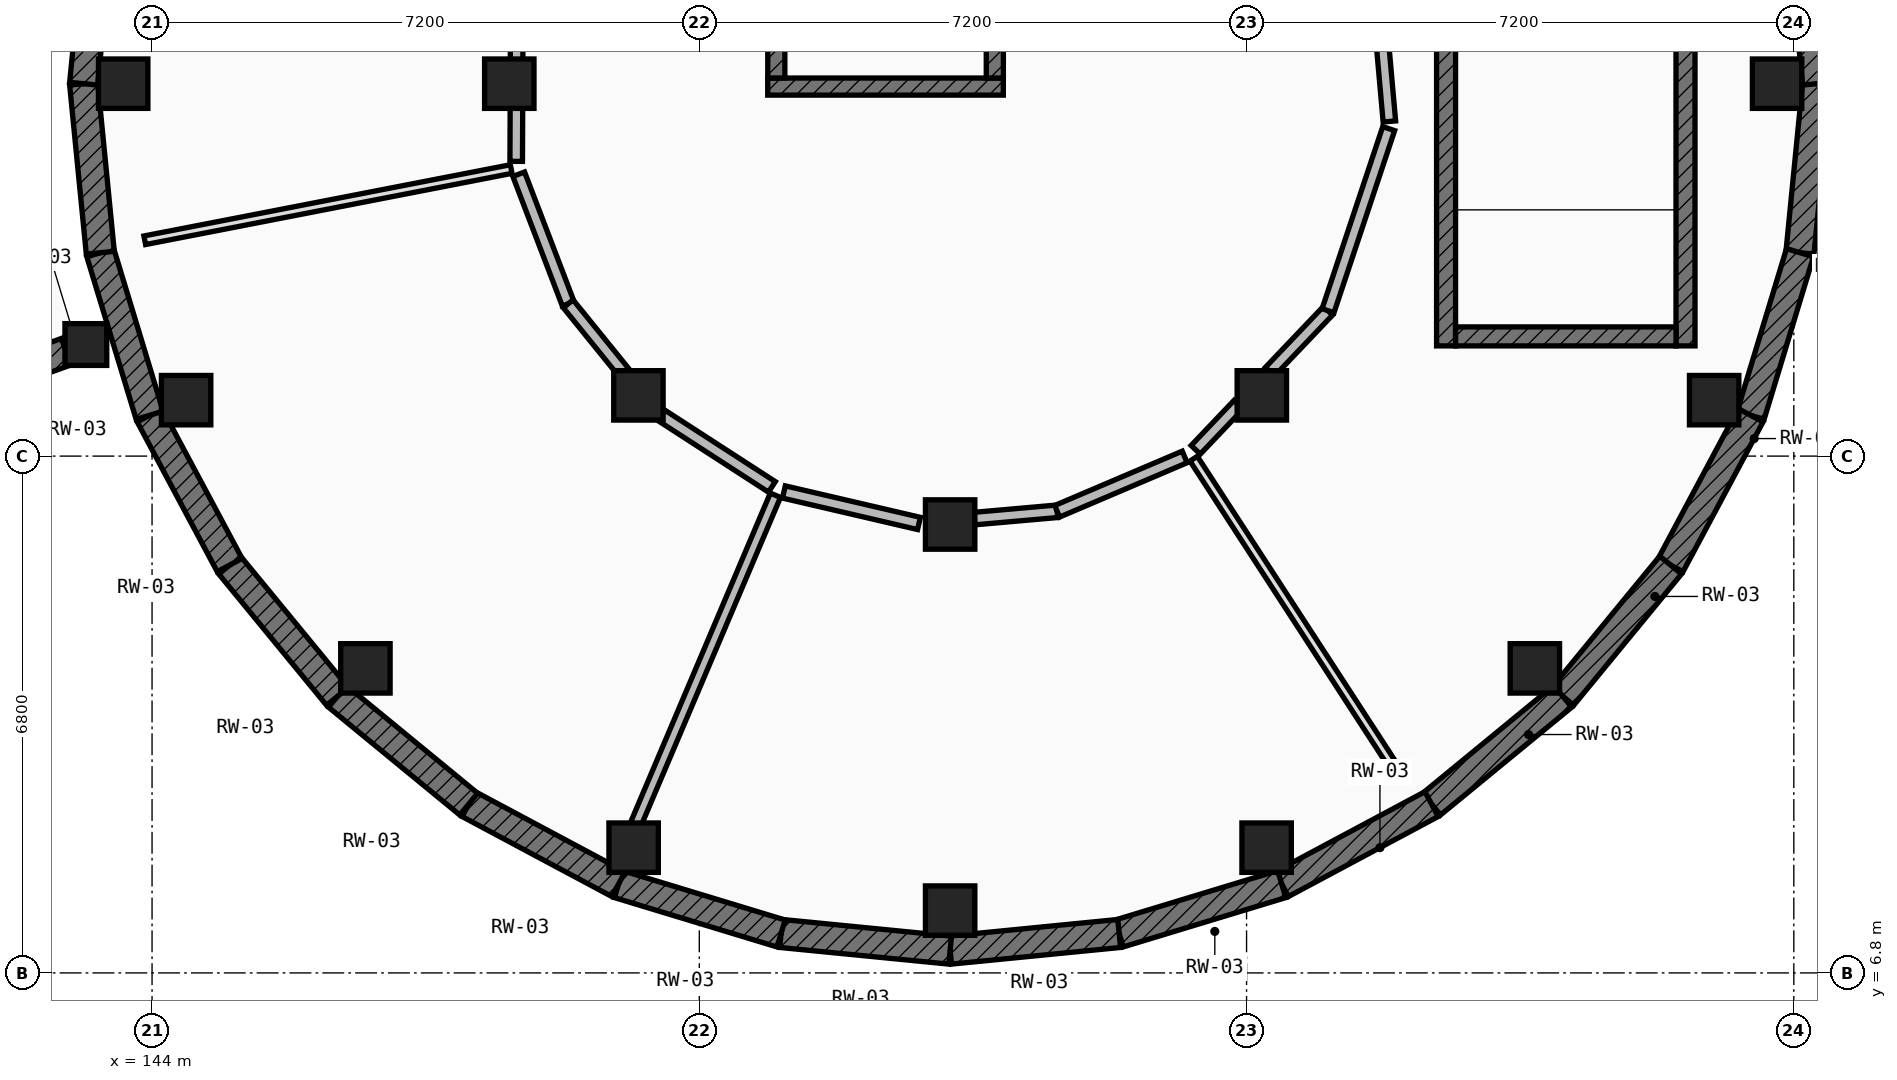
"""IFC4 building model, lengths in metres.
Left out: names, types, materials, properties, quantities, classifications, styles, units other than length and angle.
Written with IfcOpenShell. Run it as: python <this file> out.ifc"""

import sys

from ifc_helpers import new_model, si_unit, direction, frame, frame_2d, origin, origin_2d, place, context, subcontext, project, spatial, rectangle, extrude, element, fill, save


model = new_model("IFC4")
c1 = context("Model", 3, precision=1e-05, world=origin(), true_north=direction((0.0, 1.0)))
c2 = subcontext(c1, "Body", "Model", "MODEL_VIEW")
j1 = project(units=[si_unit("LENGTHUNIT", "METRE"), si_unit("PLANEANGLEUNIT", "RADIAN")], contexts=[c1])
p1 = place(None, origin())
s1 = spatial("IfcSite", under=j1, at=p1, CompositionType="ELEMENT")
p2 = place(p1, origin())
s2 = spatial("IfcBuilding", under=s1, at=p2, CompositionType="ELEMENT")
p3 = place(p2, frame((0.0, 0.0, -4.55)))
s3 = spatial("IfcBuildingStorey", under=s2, at=p3, CompositionType="ELEMENT", Elevation=-4.55)
for number, where, z_axis, x_axis in (
    (1, (165.38, 18.5, 0.0), (0.0, 0.0, 1.0), (1.0, 0.0, 0.0)),
    (2, (143.62, 18.5, 0.0), (0.0, 0.0, 1.0), (1.0, 0.0, 0.0)),
    (3, (144.448, 14.336, 0.0), (0.0, 0.0, 1.0), (1.0, 0.0, 0.0)),
    (4, (146.807, 10.807, 0.0), (0.0, 0.0, 1.0), (1.0, 0.0, 0.0)),
    (5, (150.336, 8.448, 0.0), (0.0, 0.0, 1.0), (1.0, 0.0, 0.0)),
    (6, (154.5, 7.62, 0.0), (0.0, 0.0, 1.0), (1.0, 0.0, 0.0)),
    (7, (158.664, 8.448, 0.0), (0.0, 0.0, 1.0), (1.0, 0.0, 0.0)),
    (8, (162.193, 10.807, 0.0), (0.0, 0.0, 1.0), (1.0, 0.0, 0.0)),
    (9, (164.552, 14.336, 0.0), (0.0, 0.0, 1.0), (1.0, 0.0, 0.0)),
    (10, (148.7, 18.5, 0.0), (0.0, 0.0, 1.0), (1.0, 0.0, 0.0)),
    (11, (150.399, 14.399, 0.0), (0.0, 0.0, 1.0), (1.0, 0.0, 0.0)),
    (12, (154.5, 12.7, 0.0), (0.0, 0.0, 1.0), (1.0, 0.0, 0.0)),
    (13, (158.601, 14.399, 0.0), (0.0, 0.0, 1.0), (1.0, 0.0, 0.0)),
):
    element("IfcColumn", number, at=place(p3, frame(where, z_axis=z_axis, x_axis=x_axis)), inside=s3, PredefinedType="COLUMN", context=c2, shape_type="SweptSolid", body=[
        extrude(rectangle(XDim=0.65, YDim=0.65, at=origin_2d()), origin(), (0.0, 0.0, 1.0), 4.55),
    ])
p4 = place(p3, frame((143.129, 15.068, 0.0), z_axis=(0.0, 0.0, 1.0), x_axis=(1.0, 0.0, 0.0)))
e14 = element("IfcColumn", 14, at=p4, inside=s3, PredefinedType="COLUMN", context=c2, shape_type="SweptSolid", body=[
    extrude(rectangle(XDim=0.55, YDim=0.55, at=origin_2d()), origin(), (0.0, 0.0, 1.0), 4.55),
])
p5 = place(p3, frame((165.9, 18.5, 0.0), z_axis=(0.0, 0.0, 1.0), x_axis=(-0.097989369151, -0.995187461503, 0.0)))
e15 = element("IfcWall", 15, at=p5, inside=s3, PredefinedType="USERDEFINED", context=c2, shape_type="SweptSolid", body=[
    extrude(rectangle(XDim=2.235, YDim=0.37, at=frame_2d((1.117, 0.0))), origin(), (0.0, 0.0, 1.0), 3.348),
])
p6 = place(p3, frame((165.681, 16.276, 0.0), z_axis=(0.0, 0.0, 1.0), x_axis=(-0.290322655883, -0.956928814218, 0.0)))
e16 = element("IfcWall", 16, at=p6, inside=s3, PredefinedType="USERDEFINED", context=c2, shape_type="SweptSolid", body=[
    extrude(rectangle(XDim=2.235, YDim=0.37, at=frame_2d((1.118, 0.0))), origin(), (0.0, 0.0, 1.0), 3.348),
])
for number, where, z_axis, x_axis in (
    (17, (165.032, 14.137, 0.0), (0.0, 0.0, 1.0), (-0.471, -0.882, 0.0)),
    (18, (163.979, 12.166, 0.0), (0.0, 0.0, 1.0), (-0.635, -0.773, 0.0)),
    (19, (162.561, 10.439, 0.0), (0.0, 0.0, 1.0), (-0.773, -0.635, 0.0)),
    (20, (160.834, 9.021, 0.0), (0.0, 0.0, 1.0), (-0.882, -0.471, 0.0)),
):
    element("IfcWall", number, at=place(p3, frame(where, z_axis=z_axis, x_axis=x_axis)), inside=s3, PredefinedType="USERDEFINED", context=c2, shape_type="SweptSolid", body=[
        extrude(rectangle(XDim=2.235, YDim=0.37, at=frame_2d((1.117, 0.0))), origin(), (0.0, 0.0, 1.0), 3.348),
    ])
p7 = place(p3, frame((158.863, 7.968, 0.0), z_axis=(0.0, 0.0, 1.0), x_axis=(-0.956928814218, -0.290322655883, 0.0)))
e21 = element("IfcWall", 21, at=p7, inside=s3, PredefinedType="USERDEFINED", context=c2, shape_type="SweptSolid", body=[
    extrude(rectangle(XDim=2.235, YDim=0.37, at=frame_2d((1.118, 0.0))), origin(), (0.0, 0.0, 1.0), 3.348),
])
for number, where, z_axis, x_axis in (
    (22, (156.724, 7.319, 0.0), (0.0, 0.0, 1.0), (-0.995, -0.098, 0.0)),
    (23, (154.5, 7.1, 0.0), (0.0, 0.0, 1.0), (-0.995, 0.098, 0.0)),
):
    element("IfcWall", number, at=place(p3, frame(where, z_axis=z_axis, x_axis=x_axis)), inside=s3, PredefinedType="USERDEFINED", context=c2, shape_type="SweptSolid", body=[
        extrude(rectangle(XDim=2.235, YDim=0.37, at=frame_2d((1.117, 0.0))), origin(), (0.0, 0.0, 1.0), 3.348),
    ])
p8 = place(p3, frame((152.276, 7.319, 0.0), z_axis=(0.0, 0.0, 1.0), x_axis=(-0.956928814218, 0.290322655883, 0.0)))
e24 = element("IfcWall", 24, at=p8, inside=s3, PredefinedType="USERDEFINED", context=c2, shape_type="SweptSolid", body=[
    extrude(rectangle(XDim=2.235, YDim=0.37, at=frame_2d((1.118, 0.0))), origin(), (0.0, 0.0, 1.0), 3.348),
])
for number, where, z_axis, x_axis in (
    (25, (150.137, 7.968, 0.0), (0.0, 0.0, 1.0), (-0.882, 0.471, 0.0)),
    (26, (148.166, 9.021, 0.0), (0.0, 0.0, 1.0), (-0.773, 0.635, 0.0)),
    (27, (146.439, 10.439, 0.0), (0.0, 0.0, 1.0), (-0.635, 0.773, 0.0)),
    (28, (145.021, 12.166, 0.0), (0.0, 0.0, 1.0), (-0.471, 0.882, 0.0)),
):
    element("IfcWall", number, at=place(p3, frame(where, z_axis=z_axis, x_axis=x_axis)), inside=s3, PredefinedType="USERDEFINED", context=c2, shape_type="SweptSolid", body=[
        extrude(rectangle(XDim=2.235, YDim=0.37, at=frame_2d((1.117, 0.0))), origin(), (0.0, 0.0, 1.0), 3.348),
    ])
p9 = place(p3, frame((143.968, 14.137, 0.0), z_axis=(0.0, 0.0, 1.0), x_axis=(-0.290322655883, 0.956928814218, 0.0)))
e29 = element("IfcWall", 29, at=p9, inside=s3, PredefinedType="USERDEFINED", context=c2, shape_type="SweptSolid", body=[
    extrude(rectangle(XDim=2.235, YDim=0.37, at=frame_2d((1.118, 0.0))), origin(), (0.0, 0.0, 1.0), 3.348),
])
for number, where, z_axis, x_axis in (
    (30, (143.319, 16.276, 0.0), (0.0, 0.0, 1.0), (-0.098, 0.995, 0.0)),
    (31, (143.1, 18.5, 0.0), (0.0, 0.0, 1.0), (0.098, 0.995, 0.0)),
    (32, (165.681, 20.724, 0.0), (0.0, 0.0, 1.0), (0.098, -0.995, 0.0)),
):
    element("IfcWall", number, at=place(p3, frame(where, z_axis=z_axis, x_axis=x_axis)), inside=s3, PredefinedType="USERDEFINED", context=c2, shape_type="SweptSolid", body=[
        extrude(rectangle(XDim=2.235, YDim=0.37, at=frame_2d((1.117, 0.0))), origin(), (0.0, 0.0, 1.0), 3.348),
    ])
p10 = place(p3, frame((138.311, 13.323, 0.0), z_axis=(0.0, 0.0, 1.0), x_axis=(0.940238058324, 0.340517831661, 0.0)))
e33 = element("IfcWall", 33, at=p10, inside=s3, PredefinedType="USERDEFINED", context=c2, shape_type="SweptSolid", body=[
    extrude(rectangle(XDim=4.849, YDim=0.37, at=frame_2d((2.424, 0.0))), origin(), (0.0, 0.0, 1.0), 3.645),
])
p11 = place(p3, frame((161.025, 21.95, 0.0), z_axis=(0.0, 0.0, 1.0), x_axis=(0.0, -1.0, 0.0)))
e34 = element("IfcWall", 34, at=p11, inside=s3, PredefinedType="SHEAR", context=c2, shape_type="SweptSolid", body=[
    extrude(rectangle(XDim=6.9, YDim=0.25, at=frame_2d((3.45, 0.0))), origin(), (0.0, 0.0, 1.0), 4.148),
])
p12 = place(p11, frame((0.43, 0.0, 0.0)))
e35 = element("IfcOpeningElement", 35, at=p12, cuts=e34, PredefinedType="OPENING", context=c2, shape_type="SweptSolid", body=[
    extrude(rectangle(XDim=1.1, YDim=2.15, at=frame_2d((0.55, 1.075))), frame((0.0, 0.135, 0.0), z_axis=(0.0, -1.0, 0.0), x_axis=(1.0, 0.0, 0.0)), (0.0, 0.0, 1.0), 0.27),
])
p13 = place(p3, frame((164.175, 21.95, 0.0), z_axis=(0.0, 0.0, 1.0), x_axis=(0.0, -1.0, 0.0)))
e36 = element("IfcWall", 36, at=p13, inside=s3, PredefinedType="SHEAR", context=c2, shape_type="SweptSolid", body=[
    extrude(rectangle(XDim=6.9, YDim=0.25, at=frame_2d((3.45, 0.0))), origin(), (0.0, 0.0, 1.0), 4.148),
])
p14 = place(p3, frame((161.15, 15.175, 0.0), z_axis=(0.0, 0.0, 1.0), x_axis=(1.0, 0.0, 0.0)))
e37 = element("IfcWall", 37, at=p14, inside=s3, PredefinedType="SHEAR", context=c2, shape_type="SweptSolid", body=[
    extrude(rectangle(XDim=2.9, YDim=0.25, at=frame_2d((1.45, 0.0))), origin(), (0.0, 0.0, 1.0), 4.148),
])
p15 = place(p3, frame((152.1, 18.462, 0.0), z_axis=(0.0, 0.0, 1.0), x_axis=(1.0, 0.0, 0.0)))
e38 = element("IfcWall", 38, at=p15, inside=s3, PredefinedType="SHEAR", context=c2, shape_type="SweptSolid", body=[
    extrude(rectangle(XDim=3.1, YDim=0.225, at=frame_2d((1.55, 0.0))), origin(), (0.0, 0.0, 1.0), 4.148),
])
p16 = place(p15, frame((0.95, 0.0, 0.0)))
e39 = element("IfcOpeningElement", 39, at=p16, cuts=e38, PredefinedType="OPENING", context=c2, shape_type="SweptSolid", body=[
    extrude(rectangle(XDim=1.2, YDim=2.2, at=frame_2d((0.6, 1.1))), frame((0.0, 0.123, 0.0), z_axis=(0.0, -1.0, 0.0), x_axis=(1.0, 0.0, 0.0)), (0.0, 0.0, 1.0), 0.245),
])
for number, where, z_axis, x_axis in (
    (40, (152.213, 18.575, 0.0), (0.0, 0.0, 1.0), (0.0, 1.0, 0.0)),
    (41, (155.088, 18.575, 0.0), (0.0, 0.0, 1.0), (0.0, 1.0, 0.0)),
):
    element("IfcWall", number, at=place(p3, frame(where, z_axis=z_axis, x_axis=x_axis)), inside=s3, PredefinedType="SHEAR", context=c2, shape_type="SweptSolid", body=[
        extrude(rectangle(XDim=2.15, YDim=0.225, at=frame_2d((1.075, 0.0))), origin(), (0.0, 0.0, 1.0), 4.148),
    ])
p17 = place(p3, frame((148.725, 17.377, 0.0), z_axis=(0.0, 0.0, 1.0), x_axis=(-0.981631167978, -0.190788495604, 0.0)))
e42 = element("IfcWall", 42, at=p17, inside=s3, PredefinedType="PARTITIONING", context=c2, shape_type="SweptSolid", body=[
    extrude(rectangle(XDim=4.911, YDim=0.115, at=frame_2d((2.456, 0.0))), origin(), (0.0, 0.0, 1.0), 3.323),
])
p18 = place(p3, frame((152.201, 13.085, 0.0), z_axis=(0.0, 0.0, 1.0), x_axis=(-0.390680175244, -0.920526480157, 0.0)))
e43 = element("IfcWall", 43, at=p18, inside=s3, PredefinedType="PARTITIONING", context=c2, shape_type="SweptSolid", body=[
    extrude(rectangle(XDim=4.907, YDim=0.145, at=frame_2d((2.453, 0.0))), origin(), (0.0, 0.0, 1.0), 3.323),
])
p19 = place(p3, frame((157.704, 13.566, 0.0), z_axis=(0.0, 0.0, 1.0), x_axis=(0.544732798291, -0.83860966991, 0.0)))
e44 = element("IfcWall", 44, at=p19, inside=s3, PredefinedType="PARTITIONING", context=c2, shape_type="SweptSolid", body=[
    extrude(rectangle(XDim=4.903, YDim=0.115, at=frame_2d((2.452, 0.0))), origin(), (0.0, 0.0, 1.0), 3.323),
])
p20 = place(p3, frame((148.799, 19.569, 0.0), z_axis=(0.0, 0.0, 1.0), x_axis=(-0.004213900998, -0.99999112148, 0.0)))
e45 = element("IfcWall", 45, at=p20, inside=s3, PredefinedType="PARTITIONING", context=c2, shape_type="SweptSolid", body=[
    extrude(rectangle(XDim=0.753, YDim=0.165, at=frame_2d((0.376, 0.0))), origin(), (0.0, 0.0, 1.0), 3.323),
])
p21 = place(p3, frame((148.794, 18.184, 0.0), z_axis=(0.0, 0.0, 1.0), x_axis=(-0.004149341873, -0.999991391444, 0.0)))
e46 = element("IfcWall", 46, at=p21, inside=s3, PredefinedType="PARTITIONING", context=c2, shape_type="SweptSolid", body=[
    extrude(rectangle(XDim=0.706, YDim=0.165, at=frame_2d((0.353, 0.0))), origin(), (0.0, 0.0, 1.0), 3.323),
])
p22 = place(p3, frame((148.824, 17.309, 0.0), z_axis=(0.0, 0.0, 1.0), x_axis=(0.356746140056, -0.934201365636, 0.0)))
e47 = element("IfcWall", 47, at=p22, inside=s3, PredefinedType="PARTITIONING", context=c2, shape_type="SweptSolid", body=[
    extrude(rectangle(XDim=1.825, YDim=0.165, at=frame_2d((0.913, 0.0))), origin(), (0.0, 0.0, 1.0), 3.323),
])
p23 = place(p22, frame((0.472, 0.0, 0.0)))
e48 = element("IfcOpeningElement", 48, at=p23, cuts=e47, PredefinedType="OPENING", context=c2, shape_type="SweptSolid", body=[
    extrude(rectangle(XDim=0.88, YDim=2.1, at=frame_2d((0.44, 1.05))), frame((0.0, 0.093, 0.0), z_axis=(0.0, -1.0, 0.0), x_axis=(1.0, 0.0, 0.0)), (0.0, 0.0, 1.0), 0.185),
])
p24 = place(p3, frame((149.475, 15.604, 0.0), z_axis=(0.0, 0.0, 1.0), x_axis=(0.62928673226, -0.777173216601, 0.0)))
e49 = element("IfcWall", 49, at=p24, inside=s3, PredefinedType="PARTITIONING", context=c2, shape_type="SweptSolid", body=[
    extrude(rectangle(XDim=1.19, YDim=0.165, at=frame_2d((0.595, 0.0))), origin(), (0.0, 0.0, 1.0), 3.323),
])
p25 = place(p3, frame((150.641, 14.175, 0.0), z_axis=(0.0, 0.0, 1.0), x_axis=(0.839472077777, -0.543402825382, 0.0)))
e50 = element("IfcWall", 50, at=p25, inside=s3, PredefinedType="PARTITIONING", context=c2, shape_type="SweptSolid", body=[
    extrude(rectangle(XDim=1.803, YDim=0.165, at=frame_2d((0.902, 0.0))), origin(), (0.0, 0.0, 1.0), 3.323),
])
p26 = place(p3, frame((152.313, 13.128, 0.0), z_axis=(0.0, 0.0, 1.0), x_axis=(0.973942767764, -0.22679392655, 0.0)))
e51 = element("IfcWall", 51, at=p26, inside=s3, PredefinedType="PARTITIONING", context=c2, shape_type="SweptSolid", body=[
    extrude(rectangle(XDim=1.825, YDim=0.165, at=frame_2d((0.912, 0.0))), origin(), (0.0, 0.0, 1.0), 3.323),
])
p27 = place(p26, frame((0.252, 0.0, 0.0)))
e52 = element("IfcOpeningElement", 52, at=p27, cuts=e51, PredefinedType="OPENING", context=c2, shape_type="SweptSolid", body=[
    extrude(rectangle(XDim=1.32, YDim=2.24, at=frame_2d((0.66, 1.12))), frame((0.0, 0.093, 0.0), z_axis=(0.0, -1.0, 0.0), x_axis=(1.0, 0.0, 0.0)), (0.0, 0.0, 1.0), 0.185),
])
p28 = place(p3, frame((154.82, 12.778, 0.0), z_axis=(0.0, 0.0, 1.0), x_axis=(0.996133303229, 0.087854665208, 0.0)))
e53 = element("IfcWall", 53, at=p28, inside=s3, PredefinedType="PARTITIONING", context=c2, shape_type="SweptSolid", body=[
    extrude(rectangle(XDim=1.092, YDim=0.165, at=frame_2d((0.546, 0.0))), origin(), (0.0, 0.0, 1.0), 3.323),
])
p29 = place(p3, frame((155.908, 12.874, 0.0), z_axis=(0.0, 0.0, 1.0), x_axis=(0.919946215616, 0.392044589777, 0.0)))
e54 = element("IfcWall", 54, at=p29, inside=s3, PredefinedType="PARTITIONING", context=c2, shape_type="SweptSolid", body=[
    extrude(rectangle(XDim=1.824, YDim=0.165, at=frame_2d((0.912, 0.0))), origin(), (0.0, 0.0, 1.0), 3.323),
])
p30 = place(p3, frame((157.731, 13.683, 0.0), z_axis=(0.0, 0.0, 1.0), x_axis=(0.689282536267, 0.724492639851, 0.0)))
e55 = element("IfcWall", 55, at=p30, inside=s3, PredefinedType="PARTITIONING", context=c2, shape_type="SweptSolid", body=[
    extrude(rectangle(XDim=0.818, YDim=0.165, at=frame_2d((0.409, 0.0))), origin(), (0.0, 0.0, 1.0), 3.323),
])
p31 = place(p3, frame((158.708, 14.711, 0.0), z_axis=(0.0, 0.0, 1.0), x_axis=(0.689704707085, 0.724090751926, 0.0)))
e56 = element("IfcWall", 56, at=p31, inside=s3, PredefinedType="PARTITIONING", context=c2, shape_type="SweptSolid", body=[
    extrude(rectangle(XDim=1.108, YDim=0.165, at=frame_2d((0.554, 0.0))), origin(), (0.0, 0.0, 1.0), 3.323),
])
p32 = place(p3, frame((159.472, 15.513, 0.0), z_axis=(0.0, 0.0, 1.0), x_axis=(0.316024745021, 0.94875094758, 0.0)))
e57 = element("IfcWall", 57, at=p32, inside=s3, PredefinedType="PARTITIONING", context=c2, shape_type="SweptSolid", body=[
    extrude(rectangle(XDim=2.525, YDim=0.165, at=frame_2d((1.263, 0.0))), origin(), (0.0, 0.0, 1.0), 3.323),
])
p33 = place(p32, frame((0.823, 0.0, 0.0)))
e58 = element("IfcOpeningElement", 58, at=p33, cuts=e57, PredefinedType="OPENING", context=c2, shape_type="SweptSolid", body=[
    extrude(rectangle(XDim=0.88, YDim=2.1, at=frame_2d((0.44, 1.05))), frame((0.0, 0.093, 0.0), z_axis=(0.0, -1.0, 0.0), x_axis=(1.0, 0.0, 0.0)), (0.0, 0.0, 1.0), 0.185),
])
p34 = place(p3, frame((160.279, 18.003, 0.0), z_axis=(0.0, 0.0, 1.0), x_axis=(-0.088298877472, 0.996094025801, 0.0)))
e59 = element("IfcWall", 59, at=p34, inside=s3, PredefinedType="PARTITIONING", context=c2, shape_type="SweptSolid", body=[
    extrude(rectangle(XDim=1.653, YDim=0.165, at=frame_2d((0.827, 0.0))), origin(), (0.0, 0.0, 1.0), 3.323),
])
p35 = place(p16, origin())
e60 = element("IfcDoor", 60, at=p35, inside=s3, OperationType="DOUBLE_DOOR_SLIDING", PredefinedType="DOOR", context=c2, shape_type="SweptSolid", body=[
    extrude(rectangle(XDim=1.2, YDim=2.2, at=frame_2d((0.6, 1.1))), frame((0.0, 0.025, 0.0), z_axis=(0.0, -1.0, 0.0), x_axis=(1.0, 0.0, 0.0)), (0.0, 0.0, 1.0), 0.05),
])
fill(e39, e60)
p36 = place(p23, origin())
e61 = element("IfcDoor", 61, at=p36, inside=s3, OperationType="SINGLE_SWING_RIGHT", PredefinedType="DOOR", context=c2, shape_type="SweptSolid", body=[
    extrude(rectangle(XDim=0.88, YDim=2.1, at=frame_2d((0.44, 1.05))), frame((0.0, 0.025, 0.0), z_axis=(0.0, -1.0, 0.0), x_axis=(1.0, 0.0, 0.0)), (0.0, 0.0, 1.0), 0.05),
])
fill(e48, e61)
p37 = place(p27, origin())
e62 = element("IfcDoor", 62, at=p37, inside=s3, OperationType="SINGLE_SWING_LEFT", PredefinedType="DOOR", context=c2, shape_type="SweptSolid", body=[
    extrude(rectangle(XDim=1.32, YDim=2.24, at=frame_2d((0.66, 1.12))), frame((0.0, 0.025, 0.0), z_axis=(0.0, -1.0, 0.0), x_axis=(1.0, 0.0, 0.0)), (0.0, 0.0, 1.0), 0.05),
])
fill(e52, e62)
p38 = place(p33, origin())
e63 = element("IfcDoor", 63, at=p38, inside=s3, OperationType="SINGLE_SWING_RIGHT", PredefinedType="DOOR", context=c2, shape_type="SweptSolid", body=[
    extrude(rectangle(XDim=0.88, YDim=2.1, at=frame_2d((0.44, 1.05))), frame((0.0, 0.025, 0.0), z_axis=(0.0, -1.0, 0.0), x_axis=(1.0, 0.0, 0.0)), (0.0, 0.0, 1.0), 0.05),
])
fill(e58, e63)
save(model, sys.argv[1])
